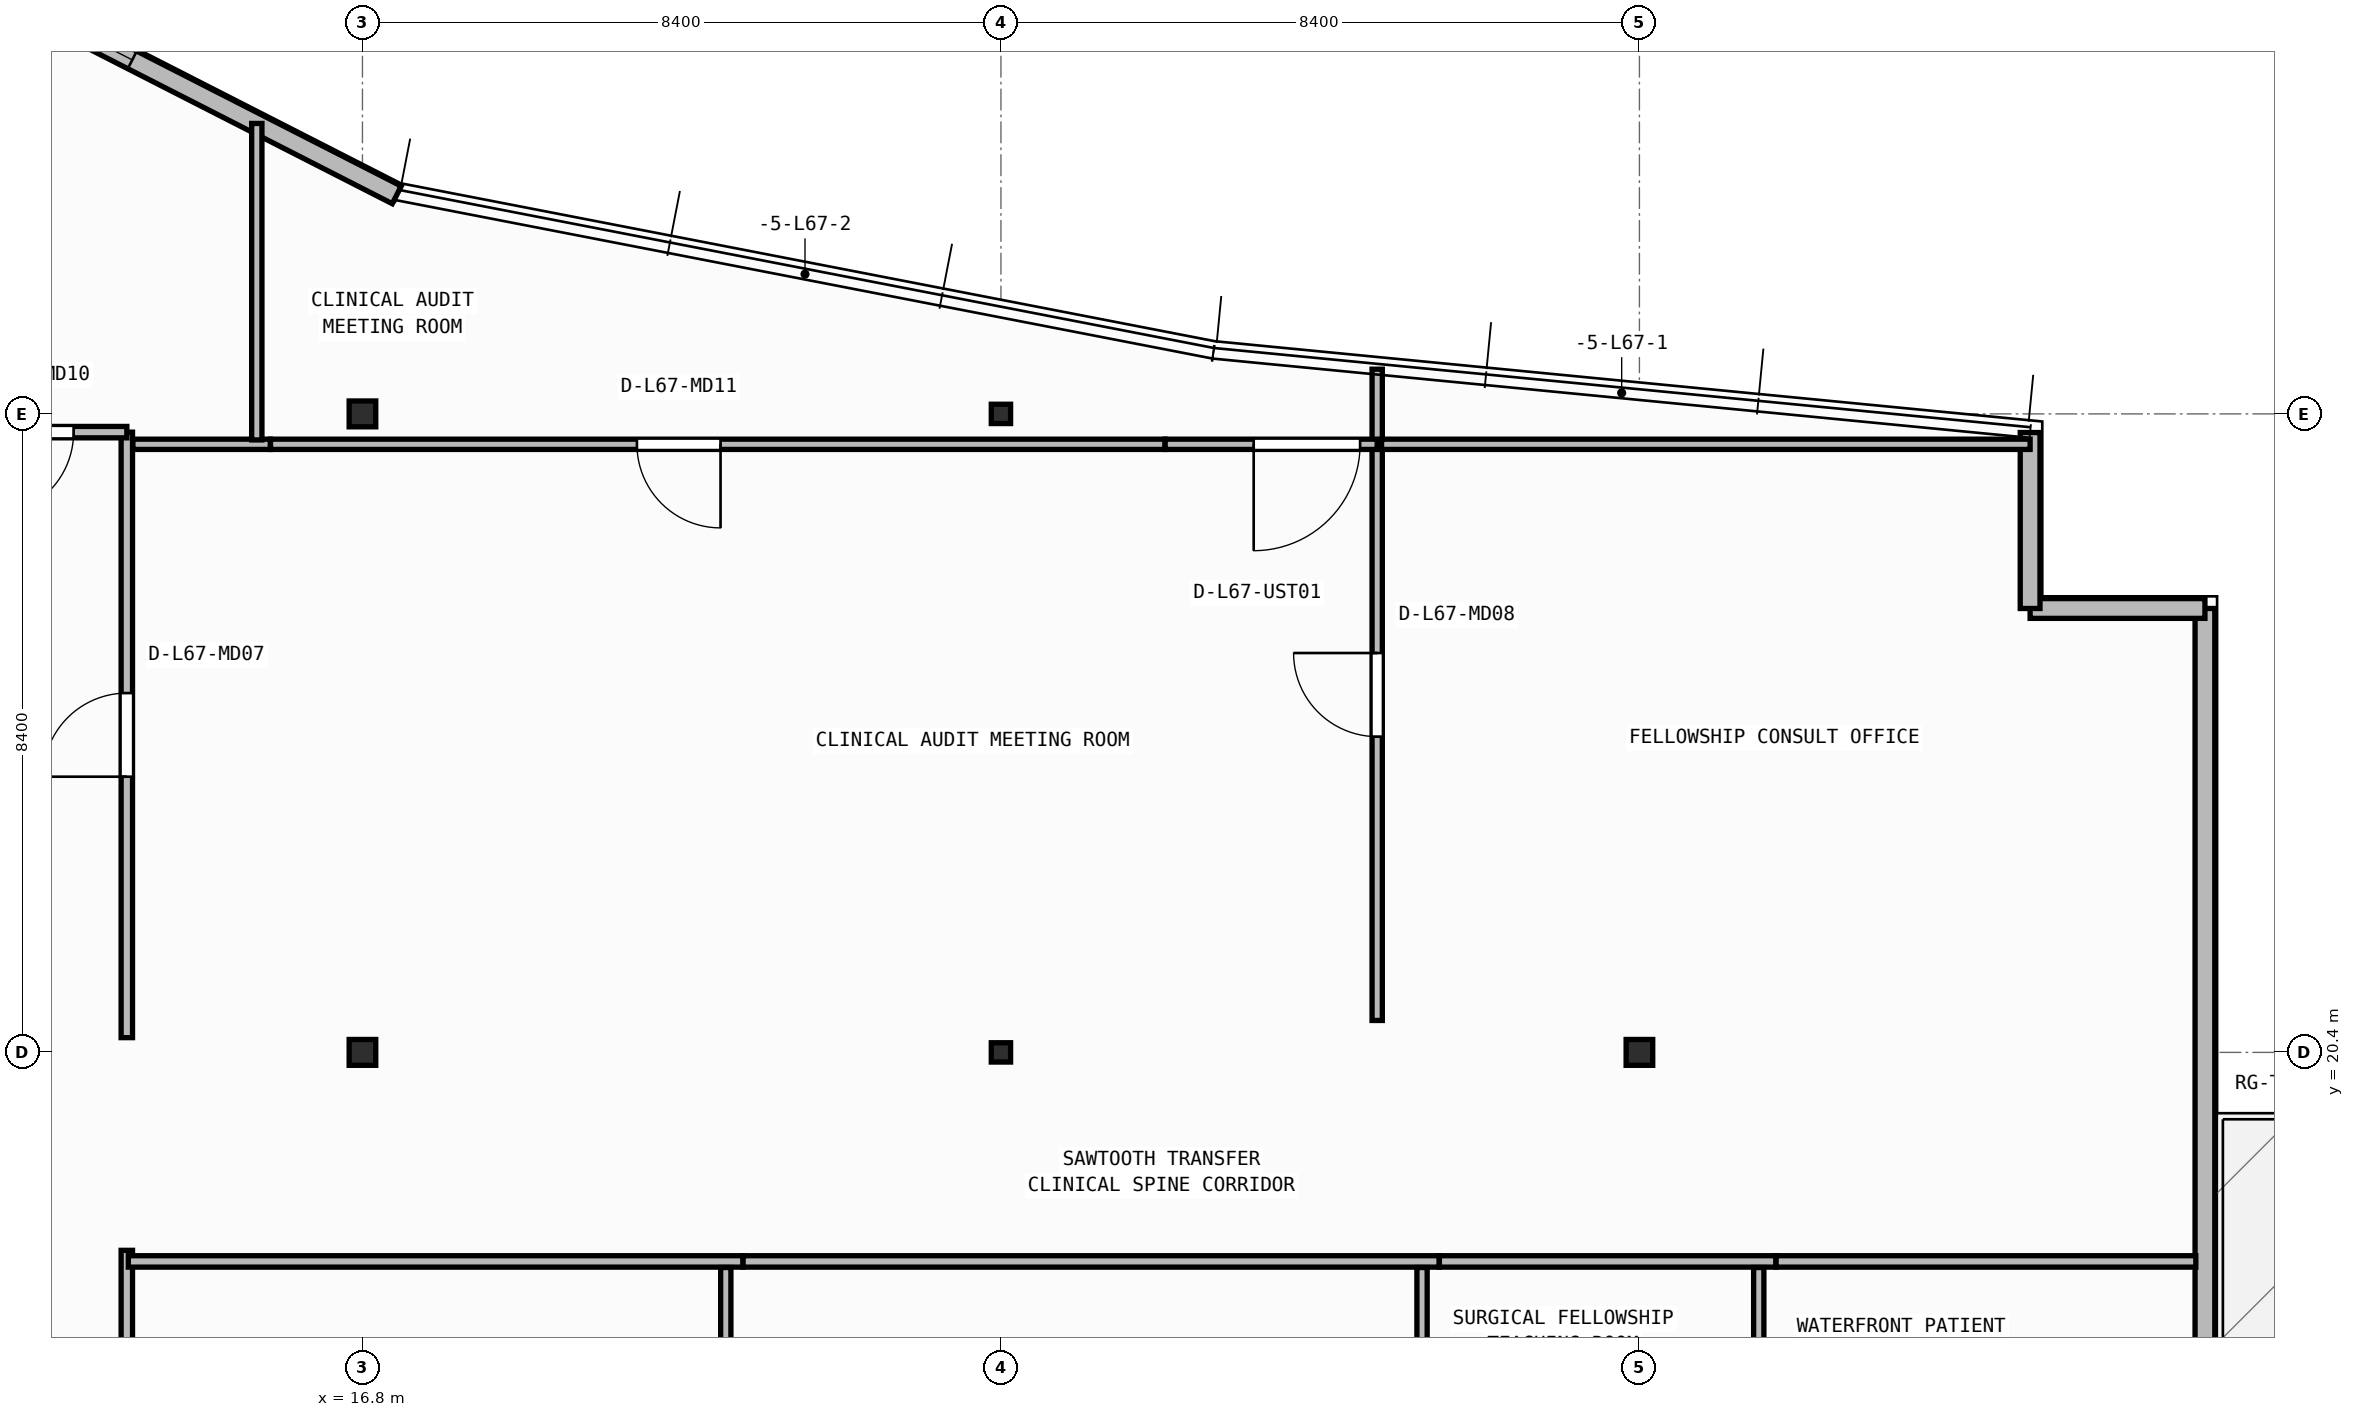
"""IFC4 building model, lengths in metres.
Left out: names, types, materials, properties, quantities, classifications, styles, units other than length and angle.
Written with IfcOpenShell. Run it as: python <this file> out.ifc"""

import sys

from ifc_helpers import new_model, si_unit, direction, frame, frame_2d, origin, origin_2d, place, context, subcontext, project, spatial, rectangle, i_section, extrude, element, fill, save


model = new_model("IFC4")
c1 = context("Model", 3, precision=1e-05, world=origin(), true_north=direction((0.0, 1.0)))
c2 = subcontext(c1, "Body", "Model", "MODEL_VIEW")
j1 = project(units=[si_unit("LENGTHUNIT", "METRE"), si_unit("PLANEANGLEUNIT", "RADIAN")], contexts=[c1])
p1 = place(None, origin())
s1 = spatial("IfcSite", under=j1, at=p1, CompositionType="ELEMENT")
p2 = place(p1, origin())
s2 = spatial("IfcBuilding", under=s1, at=p2, CompositionType="ELEMENT")
p3 = place(p2, frame((0.0, 0.0, 272.35)))
s3 = spatial("IfcBuildingStorey", under=s2, at=p3, CompositionType="ELEMENT", Elevation=272.35)
p4 = place(p3, frame((16.8, 20.4, 0.0), z_axis=(0.0, 0.0, 1.0), x_axis=(1.0, 0.0, 0.0)))
e1 = element("IfcColumn", 1, at=p4, inside=s3, PredefinedType="COLUMN", context=c2, shape_type="SweptSolid", body=[
    extrude(i_section(OverallWidth=0.35, OverallDepth=0.34, WebThickness=0.016, FlangeThickness=0.028, at=origin_2d()), origin(), (0.0, 0.0, 1.0), 3.95),
])
p5 = place(p3, frame((25.2, 20.4, 0.0), z_axis=(0.0, 0.0, 1.0), x_axis=(1.0, 0.0, 0.0)))
e2 = element("IfcColumn", 2, at=p5, inside=s3, PredefinedType="COLUMN", context=c2, shape_type="SweptSolid", body=[
    extrude(i_section(OverallWidth=0.254, OverallDepth=0.254, WebThickness=0.009, FlangeThickness=0.014, FilletRadius=0.013, at=origin_2d()), origin(), (0.0, 0.0, 1.0), 3.95),
])
for number, where, z_axis, x_axis in (
    (3, (33.6, 20.4, 0.0), (0.0, 0.0, 1.0), (1.0, 0.0, 0.0)),
    (4, (16.8, 28.8, 0.0), (0.0, 0.0, 1.0), (1.0, 0.0, 0.0)),
):
    element("IfcColumn", number, at=place(p3, frame(where, z_axis=z_axis, x_axis=x_axis)), inside=s3, PredefinedType="COLUMN", context=c2, shape_type="SweptSolid", body=[
        extrude(i_section(OverallWidth=0.35, OverallDepth=0.34, WebThickness=0.016, FlangeThickness=0.028, at=origin_2d()), origin(), (0.0, 0.0, 1.0), 3.95),
    ])
p6 = place(p3, frame((25.2, 28.8, 0.0), z_axis=(0.0, 0.0, 1.0), x_axis=(1.0, 0.0, 0.0)))
e5 = element("IfcColumn", 5, at=p6, inside=s3, PredefinedType="COLUMN", context=c2, shape_type="SweptSolid", body=[
    extrude(i_section(OverallWidth=0.254, OverallDepth=0.254, WebThickness=0.009, FlangeThickness=0.014, FilletRadius=0.013, at=origin_2d()), origin(), (0.0, 0.0, 1.0), 3.95),
])
p7 = place(p3, frame((41.04, 5.16, 0.0), z_axis=(0.0, 0.0, 1.0), x_axis=(0.0, 1.0, 0.0)))
e6 = element("IfcWall", 6, at=p7, inside=s3, PredefinedType="STANDARD", context=c2, shape_type="SweptSolid", body=[
    extrude(rectangle(XDim=21.08, YDim=0.26, at=frame_2d((10.54, 0.0))), origin(), (0.0, 0.0, 1.0), 3.71),
])
p8 = place(p7, frame((9.89, 0.0, 0.0)))
e7 = element("IfcOpeningElement", 7, at=p8, cuts=e6, PredefinedType="OPENING", context=c2, shape_type="SweptSolid", body=[
    extrude(rectangle(XDim=1.3, YDim=2.15, at=frame_2d((0.65, 1.075))), frame((0.0, 0.14, 0.0), z_axis=(0.0, -1.0, 0.0), x_axis=(1.0, 0.0, 0.0)), (0.0, 0.0, 1.0), 0.28),
])
p9 = place(p3, frame((41.04, 26.24, 0.0), z_axis=(0.0, 0.0, 1.0), x_axis=(-1.0, 0.0, 0.0)))
e8 = element("IfcWall", 8, at=p9, inside=s3, PredefinedType="STANDARD", context=c2, shape_type="SweptSolid", body=[
    extrude(rectangle(XDim=2.3, YDim=0.26, at=frame_2d((1.15, 0.0))), origin(), (0.0, 0.0, 1.0), 3.71),
])
p10 = place(p3, frame((38.74, 26.24, 0.0), z_axis=(0.0, 0.0, 1.0), x_axis=(0.0, 1.0, 0.0)))
e9 = element("IfcWall", 9, at=p10, inside=s3, PredefinedType="STANDARD", context=c2, shape_type="SweptSolid", body=[
    extrude(rectangle(XDim=2.315, YDim=0.26, at=frame_2d((1.157, 0.0))), origin(), (0.0, 0.0, 1.0), 3.71),
])
p11 = place(p3, frame((17.251, 31.681, 0.0), z_axis=(0.0, 0.0, 1.0), x_axis=(-0.89069629535, 0.454598844532, 0.0)))
e10 = element("IfcWall", 10, at=p11, inside=s3, PredefinedType="STANDARD", context=c2, shape_type="SweptSolid", body=[
    extrude(rectangle(XDim=10.214, YDim=0.26, at=frame_2d((5.107, 0.0))), origin(), (0.0, 0.0, 1.0), 3.71),
])
p12 = place(p11, frame((3.907, 0.0, 0.9)))
e11 = element("IfcOpeningElement", 11, at=p12, cuts=e10, PredefinedType="OPENING", context=c2, shape_type="SweptSolid", body=[
    extrude(rectangle(XDim=2.4, YDim=1.65, at=frame_2d((1.2, 0.825))), frame((0.0, 0.14, 0.0), z_axis=(0.0, -1.0, 0.0), x_axis=(1.0, 0.0, 0.0)), (0.0, 0.0, 1.0), 0.28),
])
p13 = place(p3, frame((13.7, 14.7, 0.0), z_axis=(0.0, 0.0, 1.0), x_axis=(0.0, 1.0, 0.0)))
e12 = element("IfcWall", 12, at=p13, inside=s3, PredefinedType="PARTITIONING", context=c2, shape_type="SweptSolid", body=[
    extrude(rectangle(XDim=3.096, YDim=0.15, at=frame_2d((1.548, 0.0))), origin(), (0.0, 0.0, 1.0), 3.71),
])
p14 = place(p3, frame((13.7, 20.594, 0.0), z_axis=(0.0, 0.0, 1.0), x_axis=(0.0, 1.0, 0.0)))
e13 = element("IfcWall", 13, at=p14, inside=s3, PredefinedType="PARTITIONING", context=c2, shape_type="SweptSolid", body=[
    extrude(rectangle(XDim=7.966, YDim=0.15, at=frame_2d((3.983, 0.0))), origin(), (0.0, 0.0, 1.0), 3.71),
])
p15 = place(p14, frame((3.433, 0.0, 0.0)))
e14 = element("IfcOpeningElement", 14, at=p15, cuts=e13, PredefinedType="OPENING", context=c2, shape_type="SweptSolid", body=[
    extrude(rectangle(XDim=1.1, YDim=2.1, at=frame_2d((0.55, 1.05))), frame((0.0, 0.085, 0.0), z_axis=(0.0, -1.0, 0.0), x_axis=(1.0, 0.0, 0.0)), (0.0, 0.0, 1.0), 0.17),
])
p16 = place(p3, frame((13.7, 28.56, 0.0), z_axis=(0.0, 0.0, 1.0), x_axis=(-1.0, 0.0, 0.0)))
e15 = element("IfcWall", 15, at=p16, inside=s3, PredefinedType="PARTITIONING", context=c2, shape_type="SweptSolid", body=[
    extrude(rectangle(XDim=2.5, YDim=0.15, at=frame_2d((1.25, 0.0))), origin(), (0.0, 0.0, 1.0), 3.157),
])
p17 = place(p16, frame((0.7, 0.0, 0.0)))
e16 = element("IfcOpeningElement", 16, at=p17, cuts=e15, PredefinedType="OPENING", context=c2, shape_type="SweptSolid", body=[
    extrude(rectangle(XDim=1.1, YDim=2.1, at=frame_2d((0.55, 1.05))), frame((0.0, 0.085, 0.0), z_axis=(0.0, -1.0, 0.0), x_axis=(1.0, 0.0, 0.0)), (0.0, 0.0, 1.0), 0.17),
])
p18 = place(p3, frame((13.72, 17.65, 0.0), z_axis=(0.0, 0.0, 1.0), x_axis=(1.0, 0.0, 0.0)))
e17 = element("IfcWall", 17, at=p18, inside=s3, PredefinedType="PARTITIONING", context=c2, shape_type="SweptSolid", body=[
    extrude(rectangle(XDim=8.086, YDim=0.15, at=frame_2d((4.043, 0.0))), origin(), (0.0, 0.0, 1.0), 3.71),
])
p19 = place(p3, frame((21.808, 17.65, 0.0), z_axis=(0.0, 0.0, 1.0), x_axis=(1.0, 0.0, 0.0)))
e18 = element("IfcWall", 18, at=p19, inside=s3, PredefinedType="PARTITIONING", context=c2, shape_type="SweptSolid", body=[
    extrude(rectangle(XDim=9.158, YDim=0.15, at=frame_2d((4.579, 0.0))), origin(), (0.0, 0.0, 1.0), 3.71),
])
p20 = place(p3, frame((30.968, 17.65, 0.0), z_axis=(0.0, 0.0, 1.0), x_axis=(1.0, 0.0, 0.0)))
e19 = element("IfcWall", 19, at=p20, inside=s3, PredefinedType="PARTITIONING", context=c2, shape_type="SweptSolid", body=[
    extrude(rectangle(XDim=4.428, YDim=0.15, at=frame_2d((2.214, 0.0))), origin(), (0.0, 0.0, 1.0), 3.71),
])
p21 = place(p3, frame((35.398, 17.65, 0.0), z_axis=(0.0, 0.0, 1.0), x_axis=(1.0, 0.0, 0.0)))
e20 = element("IfcWall", 20, at=p21, inside=s3, PredefinedType="PARTITIONING", context=c2, shape_type="SweptSolid", body=[
    extrude(rectangle(XDim=5.522, YDim=0.15, at=frame_2d((2.761, 0.0))), origin(), (0.0, 0.0, 1.0), 3.71),
])
for number, where, z_axis, x_axis in (
    (21, (21.58, 14.76, 0.0), (0.0, 0.0, 1.0), (0.0, 1.0, 0.0)),
    (22, (30.74, 14.76, 0.0), (0.0, 0.0, 1.0), (0.0, 1.0, 0.0)),
    (23, (35.17, 14.76, 0.0), (0.0, 0.0, 1.0), (0.0, 1.0, 0.0)),
):
    element("IfcWall", number, at=place(p3, frame(where, z_axis=z_axis, x_axis=x_axis)), inside=s3, PredefinedType="PARTITIONING", context=c2, shape_type="SweptSolid", body=[
        extrude(rectangle(XDim=2.81, YDim=0.135, at=frame_2d((1.405, 0.0))), origin(), (0.0, 0.0, 1.0), 3.71),
    ])
p22 = place(p3, frame((30.15, 20.82, 0.0), z_axis=(0.0, 0.0, 1.0), x_axis=(0.0, 1.0, 0.0)))
e24 = element("IfcWall", 24, at=p22, inside=s3, PredefinedType="PARTITIONING", context=c2, shape_type="SweptSolid", body=[
    extrude(rectangle(XDim=8.568, YDim=0.135, at=frame_2d((4.284, 0.0))), origin(), (0.0, 0.0, 1.0), 3.71),
])
p23 = place(p22, frame((3.734, 0.0, 0.0)))
e25 = element("IfcOpeningElement", 25, at=p23, cuts=e24, PredefinedType="OPENING", context=c2, shape_type="SweptSolid", body=[
    extrude(rectangle(XDim=1.1, YDim=2.1, at=frame_2d((0.55, 1.05))), frame((0.0, 0.077, 0.0), z_axis=(0.0, -1.0, 0.0), x_axis=(1.0, 0.0, 0.0)), (0.0, 0.0, 1.0), 0.155),
])
p24 = place(p3, frame((15.588, 28.4, 0.0), z_axis=(0.0, 0.0, 1.0), x_axis=(-1.0, 0.0, 0.0)))
e26 = element("IfcWall", 26, at=p24, inside=s3, PredefinedType="PARTITIONING", context=c2, shape_type="SweptSolid", body=[
    extrude(rectangle(XDim=1.808, YDim=0.135, at=frame_2d((0.904, 0.0))), origin(), (0.0, 0.0, 1.0), 3.157),
])
p25 = place(p3, frame((27.358, 28.4, 0.0), z_axis=(0.0, 0.0, 1.0), x_axis=(-1.0, 0.0, 0.0)))
e27 = element("IfcWall", 27, at=p25, inside=s3, PredefinedType="PARTITIONING", context=c2, shape_type="SweptSolid", body=[
    extrude(rectangle(XDim=11.768, YDim=0.135, at=frame_2d((5.884, 0.0))), origin(), (0.0, 0.0, 1.0), 3.157),
])
p26 = place(p25, frame((5.847, 0.0, 0.0)))
e28 = element("IfcOpeningElement", 28, at=p26, cuts=e27, PredefinedType="OPENING", context=c2, shape_type="SweptSolid", body=[
    extrude(rectangle(XDim=1.1, YDim=2.1, at=frame_2d((0.55, 1.05))), frame((0.0, 0.077, 0.0), z_axis=(0.0, -1.0, 0.0), x_axis=(1.0, 0.0, 0.0)), (0.0, 0.0, 1.0), 0.155),
])
p27 = place(p3, frame((30.15, 28.4, 0.0), z_axis=(0.0, 0.0, 1.0), x_axis=(-1.0, 0.0, 0.0)))
e29 = element("IfcWall", 29, at=p27, inside=s3, PredefinedType="PARTITIONING", context=c2, shape_type="SweptSolid", body=[
    extrude(rectangle(XDim=2.789, YDim=0.135, at=frame_2d((1.395, 0.0))), origin(), (0.0, 0.0, 1.0), 3.71),
])
p28 = place(p27, frame((0.225, 0.0, 0.0)))
e30 = element("IfcOpeningElement", 30, at=p28, cuts=e29, PredefinedType="OPENING", context=c2, shape_type="SweptSolid", body=[
    extrude(rectangle(XDim=1.4, YDim=2.15, at=frame_2d((0.7, 1.075))), frame((0.0, 0.077, 0.0), z_axis=(0.0, -1.0, 0.0), x_axis=(1.0, 0.0, 0.0)), (0.0, 0.0, 1.0), 0.155),
])
p29 = place(p3, frame((38.74, 28.4, 0.0), z_axis=(0.0, 0.0, 1.0), x_axis=(-1.0, 0.0, 0.0)))
e31 = element("IfcWall", 31, at=p29, inside=s3, PredefinedType="PARTITIONING", context=c2, shape_type="SweptSolid", body=[
    extrude(rectangle(XDim=8.532, YDim=0.135, at=frame_2d((4.266, 0.0))), origin(), (0.0, 0.0, 1.0), 3.71),
])
p30 = place(p3, frame((15.41, 28.458, 0.0), z_axis=(0.0, 0.0, 1.0), x_axis=(0.0, 1.0, 0.0)))
e32 = element("IfcWall", 32, at=p30, inside=s3, PredefinedType="PARTITIONING", context=c2, shape_type="SweptSolid", body=[
    extrude(rectangle(XDim=4.164, YDim=0.135, at=frame_2d((2.082, 0.0))), origin(), (0.0, 0.0, 1.0), 3.71),
])
p31 = place(p12, origin())
e33 = element("IfcWindow", 33, at=p31, inside=s3, PartitioningType="SINGLE_PANEL", PredefinedType="WINDOW", context=c2, shape_type="SweptSolid", body=[
    extrude(rectangle(XDim=2.4, YDim=1.65, at=frame_2d((1.2, 0.825))), frame((0.0, 0.03, 0.0), z_axis=(0.0, -1.0, 0.0), x_axis=(1.0, 0.0, 0.0)), (0.0, 0.0, 1.0), 0.06),
])
fill(e11, e33)
p32 = place(p15, origin())
e34 = element("IfcDoor", 34, at=p32, inside=s3, OperationType="SINGLE_SWING_LEFT", PredefinedType="DOOR", context=c2, shape_type="SweptSolid", body=[
    extrude(rectangle(XDim=1.1, YDim=2.1, at=frame_2d((0.55, 1.05))), frame((0.0, 0.025, 0.0), z_axis=(0.0, -1.0, 0.0), x_axis=(1.0, 0.0, 0.0)), (0.0, 0.0, 1.0), 0.05),
])
fill(e14, e34)
p33 = place(p17, origin())
e35 = element("IfcDoor", 35, at=p33, inside=s3, OperationType="SINGLE_SWING_RIGHT", PredefinedType="DOOR", context=c2, shape_type="SweptSolid", body=[
    extrude(rectangle(XDim=1.1, YDim=2.1, at=frame_2d((0.55, 1.05))), frame((0.0, 0.025, 0.0), z_axis=(0.0, -1.0, 0.0), x_axis=(1.0, 0.0, 0.0)), (0.0, 0.0, 1.0), 0.05),
])
fill(e16, e35)
p34 = place(p23, origin())
e36 = element("IfcDoor", 36, at=p34, inside=s3, OperationType="SINGLE_SWING_RIGHT", PredefinedType="DOOR", context=c2, shape_type="SweptSolid", body=[
    extrude(rectangle(XDim=1.1, YDim=2.1, at=frame_2d((0.55, 1.05))), frame((0.0, 0.025, 0.0), z_axis=(0.0, -1.0, 0.0), x_axis=(1.0, 0.0, 0.0)), (0.0, 0.0, 1.0), 0.05),
])
fill(e25, e36)
p35 = place(p26, origin())
e37 = element("IfcDoor", 37, at=p35, inside=s3, OperationType="SINGLE_SWING_LEFT", PredefinedType="DOOR", context=c2, shape_type="SweptSolid", body=[
    extrude(rectangle(XDim=1.1, YDim=2.1, at=frame_2d((0.55, 1.05))), frame((0.0, 0.025, 0.0), z_axis=(0.0, -1.0, 0.0), x_axis=(1.0, 0.0, 0.0)), (0.0, 0.0, 1.0), 0.05),
])
fill(e28, e37)
p36 = place(p28, origin())
e38 = element("IfcDoor", 38, at=p36, inside=s3, OperationType="SINGLE_SWING_RIGHT", PredefinedType="DOOR", context=c2, shape_type="SweptSolid", body=[
    extrude(rectangle(XDim=1.4, YDim=2.15, at=frame_2d((0.7, 1.075))), frame((0.0, 0.025, 0.0), z_axis=(0.0, -1.0, 0.0), x_axis=(1.0, 0.0, 0.0)), (0.0, 0.0, 1.0), 0.05),
])
fill(e30, e38)
save(model, sys.argv[1])
